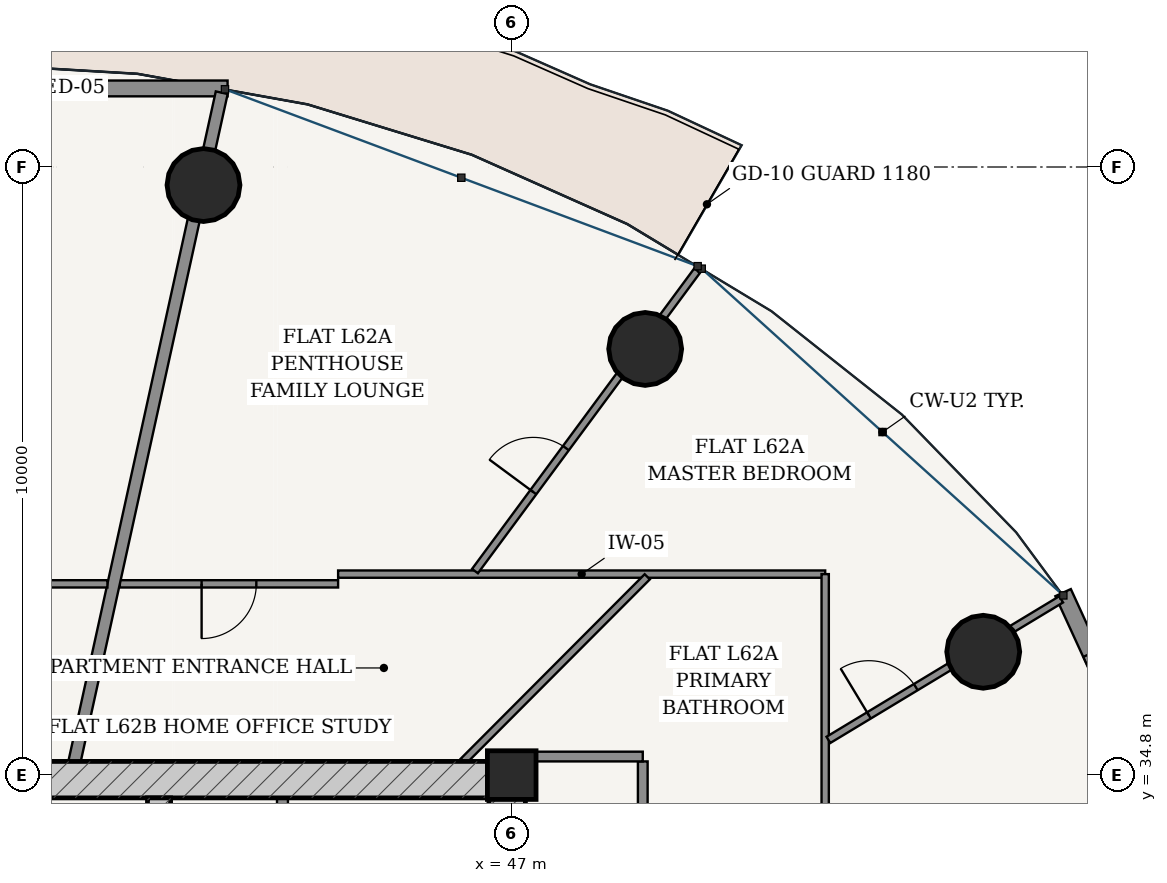
"""IFC4 building model, lengths in metres.
Left out: names, types, materials, properties, quantities, classifications, styles, units other than length and angle.
Written with IfcOpenShell. Run it as: python <this file> out.ifc"""

import sys

from ifc_helpers import new_model, si_unit, direction, frame, frame_2d, origin, origin_2d, place, context, subcontext, project, spatial, rectangle, hollow_circle, extrude, source, transform, mapped, element, fill, save


model = new_model("IFC4")
c1 = context("Model", 3, precision=1e-05, world=origin(), true_north=direction((-0.2419218956, 0.970295726276)))
c2 = subcontext(c1, "Body", "Model", "MODEL_VIEW")
j1 = project(units=[si_unit("LENGTHUNIT", "METRE"), si_unit("PLANEANGLEUNIT", "RADIAN")], contexts=[c1])
p1 = place(None, origin())
s1 = spatial("IfcSite", under=j1, at=p1, CompositionType="ELEMENT")
p2 = place(p1, origin())
s2 = spatial("IfcBuilding", under=s1, at=p2, CompositionType="ELEMENT")
p3 = place(p2, frame((0.0, 0.0, 235.6)))
s3 = spatial("IfcBuildingStorey", under=s2, at=p3, CompositionType="ELEMENT", Elevation=235.6)
p4 = place(p3, frame((47.0, 34.8, 0.0), z_axis=(0.0, 0.0, 1.0), x_axis=(1.0, 0.0, 0.0)))
e1 = element("IfcColumn", 1, at=p4, inside=s3, PredefinedType="COLUMN", context=c2, shape_type="SweptSolid", body=[
    extrude(rectangle(XDim=0.8, YDim=0.8, at=origin_2d()), origin(), (0.0, 0.0, 1.0), 3.7),
])
p5 = place(p3, frame((28.775, 34.725, 0.0), z_axis=(0.0, 0.0, 1.0), x_axis=(1.0, 0.0, 0.0)))
e2 = element("IfcWall", 2, at=p5, inside=s3, PredefinedType="SHEAR", context=c2, shape_type="SweptSolid", body=[
    extrude(rectangle(XDim=18.45, YDim=0.6, at=frame_2d((9.225, 0.0))), origin(), (0.0, 0.0, 1.0), 3.435),
])
p6 = place(p3, frame((46.925, 19.175, 0.0), z_axis=(0.0, 0.0, 1.0), x_axis=(0.0, 1.0, 0.0)))
e3 = element("IfcWall", 3, at=p6, inside=s3, PredefinedType="SHEAR", context=c2, shape_type="SweptSolid", body=[
    extrude(rectangle(XDim=15.25, YDim=0.6, at=frame_2d((7.625, 0.0))), origin(), (0.0, 0.0, 1.0), 3.435),
])
p7 = place(p6, frame((9.875, 0.0, 0.0)))
e4 = element("IfcOpeningElement", 4, at=p7, cuts=e3, PredefinedType="OPENING", context=c2, shape_type="SweptSolid", body=[
    extrude(rectangle(XDim=1.5, YDim=2.2, at=frame_2d((0.75, 1.1))), frame((0.0, 0.31, 0.0), z_axis=(0.0, -1.0, 0.0), x_axis=(1.0, 0.0, 0.0)), (0.0, 0.0, 1.0), 0.62),
])
p8 = place(p3, frame((41.2, 19.175, 0.0), z_axis=(0.0, 0.0, 1.0), x_axis=(0.0, 1.0, 0.0)))
e5 = element("IfcWall", 5, at=p8, inside=s3, PredefinedType="SHEAR", context=c2, shape_type="SweptSolid", body=[
    extrude(rectangle(XDim=15.25, YDim=0.38, at=frame_2d((7.625, 0.0))), origin(), (0.0, 0.0, 1.0), 3.435),
])
p9 = place(p8, frame((7.8, 0.0, 0.0)))
e6 = element("IfcOpeningElement", 6, at=p9, cuts=e5, PredefinedType="OPENING", context=c2, shape_type="SweptSolid", body=[
    extrude(rectangle(XDim=1.05, YDim=2.15, at=frame_2d((0.525, 1.075))), frame((0.0, 0.2, 0.0), z_axis=(0.0, -1.0, 0.0), x_axis=(1.0, 0.0, 0.0)), (0.0, 0.0, 1.0), 0.4),
])
for number, where, z_axis, x_axis in (
    (7, (54.754, 36.828, 0.0), (0.0, 0.0, 1.0), (1.0, 0.0, 0.0)),
    (8, (49.195, 41.808, 0.0), (0.0, 0.0, 1.0), (1.0, 0.0, 0.0)),
    (9, (41.931, 44.503, 0.0), (0.0, 0.0, 1.0), (1.0, 0.0, 0.0)),
):
    element("IfcColumn", number, at=place(p3, frame(where, z_axis=z_axis, x_axis=x_axis)), inside=s3, PredefinedType="COLUMN", context=c2, shape_type="SweptSolid", body=[
        extrude(hollow_circle(Radius=0.6, WallThickness=0.038, at=origin_2d()), origin(), (0.0, 0.0, 1.0), 3.7),
    ])
p10 = place(p3, frame((59.385, 30.565, 0.0), z_axis=(0.0, 0.0, 1.0), x_axis=(-0.416717018135, 0.909036262641, 0.0)))
e10 = element("IfcWall", 10, at=p10, inside=s3, PredefinedType="SOLIDWALL", context=c2, shape_type="SweptSolid", body=[
    extrude(rectangle(XDim=7.96, YDim=0.28, at=frame_2d((3.98, 0.0))), origin(), (0.0, 0.0, 1.0), 3.435),
])
p11 = place(p10, frame((1.099, 0.0, 0.85)))
e11 = element("IfcOpeningElement", 11, at=p11, cuts=e10, PredefinedType="OPENING", context=c2, shape_type="SweptSolid", body=[
    extrude(rectangle(XDim=2.1, YDim=1.95, at=frame_2d((1.05, 0.975))), frame((0.0, 0.15, 0.0), z_axis=(0.0, -1.0, 0.0), x_axis=(1.0, 0.0, 0.0)), (0.0, 0.0, 1.0), 0.3),
])
p12 = place(p10, frame((4.761, 0.0, 0.85)))
e12 = element("IfcOpeningElement", 12, at=p12, cuts=e10, PredefinedType="OPENING", context=c2, shape_type="SweptSolid", body=[
    extrude(rectangle(XDim=2.1, YDim=1.95, at=frame_2d((1.05, 0.975))), frame((0.0, 0.15, 0.0), z_axis=(0.0, -1.0, 0.0), x_axis=(1.0, 0.0, 0.0)), (0.0, 0.0, 1.0), 0.3),
])
p13 = place(p3, frame((42.327, 46.092, 0.0), z_axis=(0.0, 0.0, 1.0), x_axis=(-1.0, 0.0, 0.0)))
e13 = element("IfcWall", 13, at=p13, inside=s3, PredefinedType="SOLIDWALL", context=c2, shape_type="SweptSolid", body=[
    extrude(rectangle(XDim=8.654, YDim=0.26, at=frame_2d((4.327, 0.0))), origin(), (0.0, 0.0, 1.0), 3.435),
])
p14 = place(p13, frame((3.652, 0.0, 0.0)))
e14 = element("IfcOpeningElement", 14, at=p14, cuts=e13, PredefinedType="OPENING", context=c2, shape_type="SweptSolid", body=[
    extrude(rectangle(XDim=1.35, YDim=2.2, at=frame_2d((0.675, 1.1))), frame((0.0, 0.14, 0.0), z_axis=(0.0, -1.0, 0.0), x_axis=(1.0, 0.0, 0.0)), (0.0, 0.0, 1.0), 0.28),
])
p15 = place(p3, frame((43.23, 28.52, 0.0), z_axis=(0.0, 0.0, 1.0), x_axis=(0.0, 1.0, 0.0)))
e15 = element("IfcWall", 15, at=p15, inside=s3, PredefinedType="PARTITIONING", context=c2, shape_type="SweptSolid", body=[
    extrude(rectangle(XDim=5.905, YDim=0.18, at=frame_2d((2.953, 0.0))), origin(), (0.0, 0.0, 1.0), 3.435),
])
p16 = place(p15, frame((0.905, 0.0, 0.0)))
e16 = element("IfcOpeningElement", 16, at=p16, cuts=e15, PredefinedType="OPENING", context=c2, shape_type="SweptSolid", body=[
    extrude(rectangle(XDim=0.85, YDim=2.1, at=frame_2d((0.425, 1.05))), frame((0.0, 0.1, 0.0), z_axis=(0.0, -1.0, 0.0), x_axis=(1.0, 0.0, 0.0)), (0.0, 0.0, 1.0), 0.2),
])
p17 = place(p15, frame((3.655, 0.0, 0.0)))
e17 = element("IfcOpeningElement", 17, at=p17, cuts=e15, PredefinedType="OPENING", context=c2, shape_type="SweptSolid", body=[
    extrude(rectangle(XDim=1.15, YDim=2.2, at=frame_2d((0.575, 1.1))), frame((0.0, 0.1, 0.0), z_axis=(0.0, -1.0, 0.0), x_axis=(1.0, 0.0, 0.0)), (0.0, 0.0, 1.0), 0.2),
])
p18 = place(p3, frame((49.155, 16.725, 0.0), z_axis=(0.0, 0.0, 1.0), x_axis=(0.0, 1.0, 0.0)))
e18 = element("IfcWall", 18, at=p18, inside=s3, PredefinedType="PARTITIONING", context=c2, shape_type="SweptSolid", body=[
    extrude(rectangle(XDim=18.3, YDim=0.16, at=frame_2d((9.15, 0.0))), origin(), (0.0, 0.0, 1.0), 2.951),
])
p19 = place(p18, frame((7.401, 0.0, 0.0)))
e19 = element("IfcOpeningElement", 19, at=p19, cuts=e18, PredefinedType="OPENING", context=c2, shape_type="SweptSolid", body=[
    extrude(rectangle(XDim=0.98, YDim=2.2, at=frame_2d((0.49, 1.1))), frame((0.0, 0.09, 0.0), z_axis=(0.0, -1.0, 0.0), x_axis=(1.0, 0.0, 0.0)), (0.0, 0.0, 1.0), 0.18),
])
p20 = place(p3, frame((47.225, 35.105, 0.0), z_axis=(0.0, 0.0, 1.0), x_axis=(1.0, 0.0, 0.0)))
e20 = element("IfcWall", 20, at=p20, inside=s3, PredefinedType="PARTITIONING", context=c2, shape_type="SweptSolid", body=[
    extrude(rectangle(XDim=1.93, YDim=0.16, at=frame_2d((0.965, 0.0))), origin(), (0.0, 0.0, 1.0), 3.435),
])
p21 = place(p3, frame((40.555, 37.945, 0.0), z_axis=(0.0, 0.0, 1.0), x_axis=(1.0, 0.0, 0.0)))
e21 = element("IfcWall", 21, at=p21, inside=s3, PredefinedType="PARTITIONING", context=c2, shape_type="SweptSolid", body=[
    extrude(rectangle(XDim=3.59, YDim=0.12, at=frame_2d((1.795, 0.0))), origin(), (0.0, 0.0, 1.0), 2.951),
])
p22 = place(p21, frame((1.345, 0.0, 0.0)))
e22 = element("IfcOpeningElement", 22, at=p22, cuts=e21, PredefinedType="OPENING", context=c2, shape_type="SweptSolid", body=[
    extrude(rectangle(XDim=0.9, YDim=2.15, at=frame_2d((0.45, 1.075))), frame((0.0, 0.07, 0.0), z_axis=(0.0, -1.0, 0.0), x_axis=(1.0, 0.0, 0.0)), (0.0, 0.0, 1.0), 0.14),
])
p23 = place(p3, frame((44.145, 38.105, 0.0), z_axis=(0.0, 0.0, 1.0), x_axis=(1.0, 0.0, 0.0)))
e23 = element("IfcWall", 23, at=p23, inside=s3, PredefinedType="PARTITIONING", context=c2, shape_type="SweptSolid", body=[
    extrude(rectangle(XDim=8.01, YDim=0.12, at=frame_2d((4.005, 0.0))), origin(), (0.0, 0.0, 1.0), 2.951),
])
p24 = place(p3, frame((52.155, 38.105, 0.0), z_axis=(0.0, 0.0, 1.0), x_axis=(0.0, -1.0, 0.0)))
e24 = element("IfcWall", 24, at=p24, inside=s3, PredefinedType="PARTITIONING", context=c2, shape_type="SweptSolid", body=[
    extrude(rectangle(XDim=16.501, YDim=0.12, at=frame_2d((8.251, 0.0))), origin(), (0.0, 0.0, 1.0), 2.951),
])
p25 = place(p24, frame((13.395, 0.0, 0.0)))
e25 = element("IfcOpeningElement", 25, at=p25, cuts=e24, PredefinedType="OPENING", context=c2, shape_type="SweptSolid", body=[
    extrude(rectangle(XDim=0.9, YDim=2.15, at=frame_2d((0.45, 1.075))), frame((0.0, 0.07, 0.0), z_axis=(0.0, -1.0, 0.0), x_axis=(1.0, 0.0, 0.0)), (0.0, 0.0, 1.0), 0.14),
])
p26 = place(p24, frame((7.467, 0.0, 0.0)))
e26 = element("IfcOpeningElement", 26, at=p26, cuts=e24, PredefinedType="OPENING", context=c2, shape_type="SweptSolid", body=[
    extrude(rectangle(XDim=0.9, YDim=2.15, at=frame_2d((0.45, 1.075))), frame((0.0, 0.07, 0.0), z_axis=(0.0, -1.0, 0.0), x_axis=(1.0, 0.0, 0.0)), (0.0, 0.0, 1.0), 0.14),
])
p27 = place(p3, frame((52.208, 35.379, 0.0), z_axis=(0.0, 0.0, 1.0), x_axis=(0.856039372964, 0.516910622774, 0.0)))
e27 = element("IfcWall", 27, at=p27, inside=s3, PredefinedType="PARTITIONING", context=c2, shape_type="SweptSolid", body=[
    extrude(rectangle(XDim=4.471, YDim=0.12, at=frame_2d((2.236, 0.0))), origin(), (0.0, 0.0, 1.0), 2.951),
])
p28 = place(p27, frame((0.779, 0.0, 0.0)))
e28 = element("IfcOpeningElement", 28, at=p28, cuts=e27, PredefinedType="OPENING", context=c2, shape_type="SweptSolid", body=[
    extrude(rectangle(XDim=0.9, YDim=2.15, at=frame_2d((0.45, 1.075))), frame((0.0, 0.07, 0.0), z_axis=(0.0, -1.0, 0.0), x_axis=(1.0, 0.0, 0.0)), (0.0, 0.0, 1.0), 0.14),
])
p29 = place(p3, frame((46.396, 38.155, 0.0), z_axis=(0.0, 0.0, 1.0), x_axis=(0.594526205526, 0.804076234535, 0.0)))
e29 = element("IfcWall", 29, at=p29, inside=s3, PredefinedType="PARTITIONING", context=c2, shape_type="SweptSolid", body=[
    extrude(rectangle(XDim=6.146, YDim=0.12, at=frame_2d((3.073, 0.0))), origin(), (0.0, 0.0, 1.0), 2.951),
])
p30 = place(p29, frame((1.615, 0.0, 0.0)))
e30 = element("IfcOpeningElement", 30, at=p30, cuts=e29, PredefinedType="OPENING", context=c2, shape_type="SweptSolid", body=[
    extrude(rectangle(XDim=0.9, YDim=2.15, at=frame_2d((0.45, 1.075))), frame((0.0, 0.07, 0.0), z_axis=(0.0, -1.0, 0.0), x_axis=(1.0, 0.0, 0.0)), (0.0, 0.0, 1.0), 0.14),
])
p31 = place(p3, frame((46.203, 35.026, 0.0), z_axis=(0.0, 0.0, 1.0), x_axis=(0.706080585752, 0.708131489502, 0.0)))
e31 = element("IfcWall", 31, at=p31, inside=s3, PredefinedType="PARTITIONING", context=c2, shape_type="SweptSolid", body=[
    extrude(rectangle(XDim=4.285, YDim=0.12, at=frame_2d((2.143, 0.0))), origin(), (0.0, 0.0, 1.0), 2.951),
])
p32 = place(p3, frame((39.811, 35.027, 0.0), z_axis=(0.0, 0.0, 1.0), x_axis=(0.214966857327, 0.976621344356, 0.0)))
e32 = element("IfcWall", 32, at=p32, inside=s3, PredefinedType="PARTITIONING", context=c2, shape_type="SweptSolid", body=[
    extrude(rectangle(XDim=11.258, YDim=0.2, at=frame_2d((5.629, 0.0))), origin(), (0.0, 0.0, 1.0), 2.52),
])
p33 = place(p3, frame((31.855, 37.945, 0.0), z_axis=(0.0, 0.0, 1.0), x_axis=(1.0, 0.0, 0.0)))
e33 = element("IfcWall", 33, at=p33, inside=s3, PredefinedType="PARTITIONING", context=c2, shape_type="SweptSolid", body=[
    extrude(rectangle(XDim=8.496, YDim=0.12, at=frame_2d((4.248, 0.0))), origin(), (0.0, 0.0, 1.0), 2.951),
])
p34 = place(p33, frame((5.625, 0.0, 0.0)))
e34 = element("IfcOpeningElement", 34, at=p34, cuts=e33, PredefinedType="OPENING", context=c2, shape_type="SweptSolid", body=[
    extrude(rectangle(XDim=0.9, YDim=2.15, at=frame_2d((0.45, 1.075))), frame((0.0, 0.07, 0.0), z_axis=(0.0, -1.0, 0.0), x_axis=(1.0, 0.0, 0.0)), (0.0, 0.0, 1.0), 0.14),
])
m1 = source(origin(), c2, "Body", "SweptSolid", [
    extrude(rectangle(XDim=0.9, YDim=2.15, at=frame_2d((0.45, 1.075))), frame((0.0, 0.025, 0.0), z_axis=(0.0, -1.0, 0.0), x_axis=(1.0, 0.0, 0.0)), (0.0, 0.0, 1.0), 0.05),
])
p35 = place(p28, origin())
e35 = element("IfcDoor", 35, at=p35, inside=s3, OperationType="SINGLE_SWING_LEFT", PredefinedType="DOOR", context=c2, shape_type="MappedRepresentation", body=[
    mapped(m1, transform((0.0, 0.0, 0.0), scale=1.0)),
])
fill(e28, e35)
p36 = place(p30, origin())
e36 = element("IfcDoor", 36, at=p36, inside=s3, OperationType="SINGLE_SWING_LEFT", PredefinedType="DOOR", context=c2, shape_type="MappedRepresentation", body=[
    mapped(m1, transform((0.0, 0.0, 0.0), scale=1.0)),
])
fill(e30, e36)
p37 = place(p22, frame((0.9, 0.0, 0.0), z_axis=(0.0, 0.0, 1.0), x_axis=(-1.0, 0.0, 0.0)))
e37 = element("IfcDoor", 37, at=p37, inside=s3, OperationType="SINGLE_SWING_RIGHT", PredefinedType="DOOR", context=c2, shape_type="MappedRepresentation", body=[
    mapped(m1, transform((0.0, 0.0, 0.0), scale=1.0)),
])
fill(e22, e37)
save(model, sys.argv[1])
